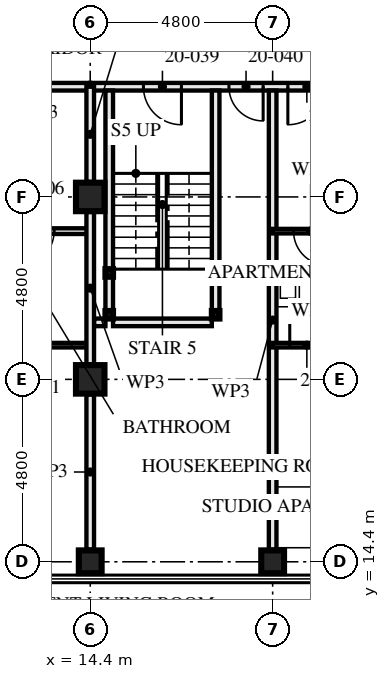
"""IFC4 building model, lengths in metres.
Left out: names, types, materials, properties, quantities, classifications, styles, units other than length and angle.
Written with IfcOpenShell. Run it as: python <this file> out.ifc"""

import sys

from ifc_helpers import new_model, si_unit, direction, frame, frame_2d, origin, origin_2d, place, context, subcontext, project, spatial, rectangle, hollow_rectangle, extrude, element, fill, save


model = new_model("IFC4")
c1 = context("Model", 3, precision=1e-05, world=origin(), true_north=direction((0.0, 1.0)))
c2 = subcontext(c1, "Body", "Model", "MODEL_VIEW")
j1 = project(units=[si_unit("LENGTHUNIT", "METRE"), si_unit("PLANEANGLEUNIT", "RADIAN")], contexts=[c1])
p1 = place(None, origin())
s1 = spatial("IfcSite", under=j1, at=p1, CompositionType="ELEMENT")
p2 = place(p1, origin())
s2 = spatial("IfcBuilding", under=s1, at=p2, CompositionType="ELEMENT")
p3 = place(p2, frame((0.0, 0.0, 76.0)))
s3 = spatial("IfcBuildingStorey", under=s2, at=p3, CompositionType="ELEMENT", Elevation=76.0)
p4 = place(p3, frame((14.4, 14.4, 0.0), z_axis=(0.0, 0.0, 1.0), x_axis=(0.0, 1.0, 0.0)))
e1 = element("IfcColumn", 1, at=p4, inside=s3, PredefinedType="COLUMN", context=c2, shape_type="SweptSolid", body=[
    extrude(hollow_rectangle(XDim=0.6, YDim=0.6, WallThickness=0.08, at=origin_2d()), origin(), (0.0, 0.0, 1.0), 3.5),
])
for number, where, z_axis, x_axis in (
    (2, (14.4, 19.2, 0.0), (0.0, 0.0, 1.0), (1.0, 0.0, 0.0)),
    (3, (14.4, 24.0, 0.0), (0.0, 0.0, 1.0), (1.0, 0.0, 0.0)),
):
    element("IfcColumn", number, at=place(p3, frame(where, z_axis=z_axis, x_axis=x_axis)), inside=s3, PredefinedType="COLUMN", context=c2, shape_type="SweptSolid", body=[
        extrude(hollow_rectangle(XDim=0.75, YDim=0.75, WallThickness=0.08, at=origin_2d()), origin(), (0.0, 0.0, 1.0), 3.5),
    ])
p5 = place(p3, frame((19.2, 14.4, 0.0), z_axis=(0.0, 0.0, 1.0), x_axis=(0.0, 1.0, 0.0)))
e4 = element("IfcColumn", 4, at=p5, inside=s3, PredefinedType="COLUMN", context=c2, shape_type="SweptSolid", body=[
    extrude(hollow_rectangle(XDim=0.6, YDim=0.6, WallThickness=0.08, at=origin_2d()), origin(), (0.0, 0.0, 1.0), 3.5),
])
for number, where, z_axis, x_axis in (
    (5, (14.9, 20.9, 0.0), (0.0, 0.0, 1.0), (1.0, 0.0, 0.0)),
    (6, (17.7, 20.9, 0.0), (0.0, 0.0, 1.0), (1.0, 0.0, 0.0)),
    (7, (14.9, 22.0, 0.0), (0.0, 0.0, 1.0), (1.0, 0.0, 0.0)),
    (8, (17.7, 22.0, 0.0), (0.0, 0.0, 1.0), (1.0, 0.0, 0.0)),
):
    element("IfcColumn", number, at=place(p3, frame(where, z_axis=z_axis, x_axis=x_axis)), inside=s3, PredefinedType="COLUMN", context=c2, shape_type="SweptSolid", body=[
        extrude(hollow_rectangle(XDim=0.2, YDim=0.2, WallThickness=0.008, at=origin_2d()), origin(), (0.0, 0.0, 1.0), 3.25),
    ])
p6 = place(p3, frame((11.6, 23.1, 0.0), z_axis=(0.0, 0.0, 1.0), x_axis=(1.0, 0.0, 0.0)))
e9 = element("IfcWall", 9, at=p6, inside=s3, PredefinedType="PARTITIONING", context=c2, shape_type="SweptSolid", body=[
    extrude(rectangle(XDim=2.8, YDim=0.15, at=frame_2d((1.4, 0.0))), origin(), (0.0, 0.0, 1.0), 3.25),
])
p7 = place(p6, frame((0.95, 0.0, 0.0)))
e10 = element("IfcOpeningElement", 10, at=p7, cuts=e9, PredefinedType="OPENING", context=c2, shape_type="SweptSolid", body=[
    extrude(rectangle(XDim=0.9, YDim=2.1, at=frame_2d((0.45, 1.05))), frame((0.0, 0.085, 0.0), z_axis=(0.0, -1.0, 0.0), x_axis=(1.0, 0.0, 0.0)), (0.0, 0.0, 1.0), 0.171),
])
p8 = place(p3, frame((9.6, 20.1, 0.0), z_axis=(0.0, 0.0, 1.0), x_axis=(1.0, 0.0, 0.0)))
e11 = element("IfcWall", 11, at=p8, inside=s3, PredefinedType="PARTITIONING", context=c2, shape_type="SweptSolid", body=[
    extrude(rectangle(XDim=4.8, YDim=0.12, at=frame_2d((2.4, 0.0))), origin(), (0.0, 0.0, 1.0), 3.25),
])
p9 = place(p8, frame((0.45, 0.0, 0.0)))
e12 = element("IfcOpeningElement", 12, at=p9, cuts=e11, PredefinedType="OPENING", context=c2, shape_type="SweptSolid", body=[
    extrude(rectangle(XDim=0.9, YDim=2.1, at=frame_2d((0.45, 1.05))), frame((0.0, 0.071, 0.0), z_axis=(0.0, -1.0, 0.0), x_axis=(1.0, 0.0, 0.0)), (0.0, 0.0, 1.0), 0.141),
])
p10 = place(p3, frame((4.8, 26.9, 0.0), z_axis=(0.0, 0.0, 1.0), x_axis=(1.0, 0.0, 0.0)))
e13 = element("IfcWall", 13, at=p10, inside=s3, PredefinedType="PARTITIONING", context=c2, shape_type="SweptSolid", body=[
    extrude(rectangle(XDim=9.6, YDim=0.2, at=frame_2d((4.8, 0.0))), origin(), (0.0, 0.0, 1.0), 3.25),
])
p11 = place(p10, frame((0.4, 0.0, 0.0)))
e14 = element("IfcOpeningElement", 14, at=p11, cuts=e13, PredefinedType="OPENING", context=c2, shape_type="SweptSolid", body=[
    extrude(rectangle(XDim=1.0, YDim=2.1, at=frame_2d((0.5, 1.05))), frame((0.0, 0.111, 0.0), z_axis=(0.0, -1.0, 0.0), x_axis=(1.0, 0.0, 0.0)), (0.0, 0.0, 1.0), 0.221),
])
p12 = place(p10, frame((5.2, 0.0, 0.0)))
e15 = element("IfcOpeningElement", 15, at=p12, cuts=e13, PredefinedType="OPENING", context=c2, shape_type="SweptSolid", body=[
    extrude(rectangle(XDim=1.0, YDim=2.1, at=frame_2d((0.5, 1.05))), frame((0.0, 0.111, 0.0), z_axis=(0.0, -1.0, 0.0), x_axis=(1.0, 0.0, 0.0)), (0.0, 0.0, 1.0), 0.221),
])
p13 = place(p3, frame((14.9, 21.0, 0.0), z_axis=(0.0, 0.0, 1.0), x_axis=(0.0, 1.0, 0.0)))
e16 = element("IfcWall", 16, at=p13, inside=s3, PredefinedType="SOLIDWALL", context=c2, shape_type="SweptSolid", body=[
    extrude(rectangle(XDim=0.9, YDim=0.2, at=frame_2d((0.45, 0.0))), origin(), (0.0, 0.0, 1.0), 2.94),
])
p14 = place(p3, frame((14.9, 22.1, 0.0), z_axis=(0.0, 0.0, 1.0), x_axis=(0.0, 1.0, 0.0)))
e17 = element("IfcWall", 17, at=p14, inside=s3, PredefinedType="SOLIDWALL", context=c2, shape_type="SweptSolid", body=[
    extrude(rectangle(XDim=4.7, YDim=0.2, at=frame_2d((2.35, 0.0))), origin(), (0.0, 0.0, 1.0), 2.94),
])
p15 = place(p3, frame((17.7, 21.0, 0.0), z_axis=(0.0, 0.0, 1.0), x_axis=(0.0, 1.0, 0.0)))
e18 = element("IfcWall", 18, at=p15, inside=s3, PredefinedType="SOLIDWALL", context=c2, shape_type="SweptSolid", body=[
    extrude(rectangle(XDim=0.9, YDim=0.2, at=frame_2d((0.45, 0.0))), origin(), (0.0, 0.0, 1.0), 2.94),
])
p16 = place(p3, frame((17.7, 22.1, 0.0), z_axis=(0.0, 0.0, 1.0), x_axis=(0.0, 1.0, 0.0)))
e19 = element("IfcWall", 19, at=p16, inside=s3, PredefinedType="SOLIDWALL", context=c2, shape_type="SweptSolid", body=[
    extrude(rectangle(XDim=4.7, YDim=0.2, at=frame_2d((2.35, 0.0))), origin(), (0.0, 0.0, 1.0), 2.94),
])
p17 = place(p3, frame((14.5, 20.7, 0.0), z_axis=(0.0, 0.0, 1.0), x_axis=(1.0, 0.0, 0.0)))
e20 = element("IfcWall", 20, at=p17, inside=s3, PredefinedType="SOLIDWALL", context=c2, shape_type="SweptSolid", body=[
    extrude(rectangle(XDim=0.3, YDim=0.2, at=frame_2d((0.15, 0.0))), origin(), (0.0, 0.0, 1.0), 3.25),
])
p18 = place(p3, frame((15.0, 20.7, 0.0), z_axis=(0.0, 0.0, 1.0), x_axis=(1.0, 0.0, 0.0)))
e21 = element("IfcWall", 21, at=p18, inside=s3, PredefinedType="SOLIDWALL", context=c2, shape_type="SweptSolid", body=[
    extrude(rectangle(XDim=2.6, YDim=0.2, at=frame_2d((1.3, 0.0))), origin(), (0.0, 0.0, 1.0), 3.25),
])
p19 = place(p3, frame((19.2, 14.72, 0.0), z_axis=(0.0, 0.0, 1.0), x_axis=(0.0, 1.0, 0.0)))
e22 = element("IfcWall", 22, at=p19, inside=s3, PredefinedType="PARTITIONING", context=c2, shape_type="SweptSolid", body=[
    extrude(rectangle(XDim=12.08, YDim=0.2, at=frame_2d((6.04, 0.0))), origin(), (0.0, 0.0, 1.0), 2.04),
])
p20 = place(p3, frame((19.2, 23.1, 0.0), z_axis=(0.0, 0.0, 1.0), x_axis=(1.0, 0.0, 0.0)))
e23 = element("IfcWall", 23, at=p20, inside=s3, PredefinedType="PARTITIONING", context=c2, shape_type="SweptSolid", body=[
    extrude(rectangle(XDim=2.0, YDim=0.12, at=frame_2d((1.0, 0.0))), origin(), (0.0, 0.0, 1.0), 3.25),
])
p21 = place(p20, frame((0.55, 0.0, 0.0)))
e24 = element("IfcOpeningElement", 24, at=p21, cuts=e23, PredefinedType="OPENING", context=c2, shape_type="SweptSolid", body=[
    extrude(rectangle(XDim=0.9, YDim=2.1, at=frame_2d((0.45, 1.05))), frame((0.0, 0.071, 0.0), z_axis=(0.0, -1.0, 0.0), x_axis=(1.0, 0.0, 0.0)), (0.0, 0.0, 1.0), 0.141),
])
p22 = place(p3, frame((19.2, 20.1, 0.0), z_axis=(0.0, 0.0, 1.0), x_axis=(1.0, 0.0, 0.0)))
e25 = element("IfcWall", 25, at=p22, inside=s3, PredefinedType="PARTITIONING", context=c2, shape_type="SweptSolid", body=[
    extrude(rectangle(XDim=4.8, YDim=0.12, at=frame_2d((2.4, 0.0))), origin(), (0.0, 0.0, 1.0), 3.25),
])
p23 = place(p22, frame((0.45, 0.0, 0.0)))
e26 = element("IfcOpeningElement", 26, at=p23, cuts=e25, PredefinedType="OPENING", context=c2, shape_type="SweptSolid", body=[
    extrude(rectangle(XDim=0.9, YDim=2.1, at=frame_2d((0.45, 1.05))), frame((0.0, 0.071, 0.0), z_axis=(0.0, -1.0, 0.0), x_axis=(1.0, 0.0, 0.0)), (0.0, 0.0, 1.0), 0.141),
])
p24 = place(p3, frame((14.4, 26.9, 0.0), z_axis=(0.0, 0.0, 1.0), x_axis=(1.0, 0.0, 0.0)))
e27 = element("IfcWall", 27, at=p24, inside=s3, PredefinedType="PARTITIONING", context=c2, shape_type="SweptSolid", body=[
    extrude(rectangle(XDim=14.4, YDim=0.2, at=frame_2d((7.2, 0.0))), origin(), (0.0, 0.0, 1.0), 2.04),
])
p25 = place(p24, frame((1.4, 0.0, 0.0)))
e28 = element("IfcOpeningElement", 28, at=p25, cuts=e27, PredefinedType="OPENING", context=c2, shape_type="SweptSolid", body=[
    extrude(rectangle(XDim=1.0, YDim=2.0, at=frame_2d((0.5, 1.0))), frame((0.0, 0.111, 0.0), z_axis=(0.0, -1.0, 0.0), x_axis=(1.0, 0.0, 0.0)), (0.0, 0.0, 1.0), 0.221),
])
p26 = place(p24, frame((3.65, 0.0, 0.0)))
e29 = element("IfcOpeningElement", 29, at=p26, cuts=e27, PredefinedType="OPENING", context=c2, shape_type="SweptSolid", body=[
    extrude(rectangle(XDim=0.9, YDim=2.0, at=frame_2d((0.45, 1.0))), frame((0.0, 0.111, 0.0), z_axis=(0.0, -1.0, 0.0), x_axis=(1.0, 0.0, 0.0)), (0.0, 0.0, 1.0), 0.221),
])
p27 = place(p24, frame((5.2, 0.0, 0.0)))
e30 = element("IfcOpeningElement", 30, at=p27, cuts=e27, PredefinedType="OPENING", context=c2, shape_type="SweptSolid", body=[
    extrude(rectangle(XDim=1.0, YDim=2.0, at=frame_2d((0.5, 1.0))), frame((0.0, 0.111, 0.0), z_axis=(0.0, -1.0, 0.0), x_axis=(1.0, 0.0, 0.0)), (0.0, 0.0, 1.0), 0.221),
])
p28 = place(p24, frame((10.0, 0.0, 0.0)))
e31 = element("IfcOpeningElement", 31, at=p28, cuts=e27, PredefinedType="OPENING", context=c2, shape_type="SweptSolid", body=[
    extrude(rectangle(XDim=1.0, YDim=2.0, at=frame_2d((0.5, 1.0))), frame((0.0, 0.111, 0.0), z_axis=(0.0, -1.0, 0.0), x_axis=(1.0, 0.0, 0.0)), (0.0, 0.0, 1.0), 0.221),
])
p29 = place(p3, frame((14.4, 14.72, 0.0), z_axis=(0.0, 0.0, 1.0), x_axis=(0.0, 1.0, 0.0)))
e32 = element("IfcWall", 32, at=p29, inside=s3, PredefinedType="PARTITIONING", context=c2, shape_type="SweptSolid", body=[
    extrude(rectangle(XDim=4.085, YDim=0.2, at=frame_2d((2.042, 0.0))), origin(), (0.0, 0.0, 1.0), 2.04),
])
p30 = place(p3, frame((14.4, 19.595, 0.0), z_axis=(0.0, 0.0, 1.0), x_axis=(0.0, 1.0, 0.0)))
e33 = element("IfcWall", 33, at=p30, inside=s3, PredefinedType="PARTITIONING", context=c2, shape_type="SweptSolid", body=[
    extrude(rectangle(XDim=4.01, YDim=0.2, at=frame_2d((2.005, 0.0))), origin(), (0.0, 0.0, 1.0), 2.04),
])
p31 = place(p3, frame((14.4, 24.395, 0.0), z_axis=(0.0, 0.0, 1.0), x_axis=(0.0, 1.0, 0.0)))
e34 = element("IfcWall", 34, at=p31, inside=s3, PredefinedType="PARTITIONING", context=c2, shape_type="SweptSolid", body=[
    extrude(rectangle(XDim=2.505, YDim=0.2, at=frame_2d((1.252, 0.0))), origin(), (0.0, 0.0, 1.0), 2.04),
])
p32 = place(p7, frame((0.9, 0.0, 0.0), z_axis=(0.0, 0.0, 1.0), x_axis=(-1.0, 0.0, 0.0)))
e35 = element("IfcDoor", 35, at=p32, inside=s3, OperationType="SINGLE_SWING_LEFT", PredefinedType="DOOR", context=c2, shape_type="SweptSolid", body=[
    extrude(rectangle(XDim=0.9, YDim=2.1, at=frame_2d((0.45, 1.05))), frame((0.0, 0.022, 0.0), z_axis=(0.0, -1.0, 0.0), x_axis=(1.0, 0.0, 0.0)), (0.0, 0.0, 1.0), 0.044),
])
fill(e10, e35)
p33 = place(p21, frame((0.9, 0.0, 0.0), z_axis=(0.0, 0.0, 1.0), x_axis=(-1.0, 0.0, 0.0)))
e36 = element("IfcDoor", 36, at=p33, inside=s3, OperationType="SINGLE_SWING_RIGHT", PredefinedType="DOOR", context=c2, shape_type="SweptSolid", body=[
    extrude(rectangle(XDim=0.9, YDim=2.1, at=frame_2d((0.45, 1.05))), frame((0.0, 0.022, 0.0), z_axis=(0.0, -1.0, 0.0), x_axis=(1.0, 0.0, 0.0)), (0.0, 0.0, 1.0), 0.044),
])
fill(e24, e36)
p34 = place(p23, origin())
e37 = element("IfcDoor", 37, at=p34, inside=s3, OperationType="SINGLE_SWING_RIGHT", PredefinedType="DOOR", context=c2, shape_type="SweptSolid", body=[
    extrude(rectangle(XDim=0.9, YDim=2.1, at=frame_2d((0.45, 1.05))), frame((0.0, 0.022, 0.0), z_axis=(0.0, -1.0, 0.0), x_axis=(1.0, 0.0, 0.0)), (0.0, 0.0, 1.0), 0.044),
])
fill(e26, e37)
p35 = place(p25, frame((1.0, 0.0, 0.0), z_axis=(0.0, 0.0, 1.0), x_axis=(-1.0, 0.0, 0.0)))
e38 = element("IfcDoor", 38, at=p35, inside=s3, OperationType="SINGLE_SWING_RIGHT", PredefinedType="DOOR", context=c2, shape_type="SweptSolid", body=[
    extrude(rectangle(XDim=1.0, YDim=2.0, at=frame_2d((0.5, 1.0))), frame((0.0, 0.032, 0.0), z_axis=(0.0, -1.0, 0.0), x_axis=(1.0, 0.0, 0.0)), (0.0, 0.0, 1.0), 0.064),
])
fill(e28, e38)
p36 = place(p26, frame((0.9, 0.0, 0.0), z_axis=(0.0, 0.0, 1.0), x_axis=(-1.0, 0.0, 0.0)))
e39 = element("IfcDoor", 39, at=p36, inside=s3, OperationType="SINGLE_SWING_RIGHT", PredefinedType="DOOR", context=c2, shape_type="SweptSolid", body=[
    extrude(rectangle(XDim=0.9, YDim=2.0, at=frame_2d((0.45, 1.0))), frame((0.0, 0.027, 0.0), z_axis=(0.0, -1.0, 0.0), x_axis=(1.0, 0.0, 0.0)), (0.0, 0.0, 1.0), 0.054),
])
fill(e29, e39)
p37 = place(p27, frame((1.0, 0.0, 0.0), z_axis=(0.0, 0.0, 1.0), x_axis=(-1.0, 0.0, 0.0)))
e40 = element("IfcDoor", 40, at=p37, inside=s3, OperationType="SINGLE_SWING_LEFT", PredefinedType="DOOR", context=c2, shape_type="SweptSolid", body=[
    extrude(rectangle(XDim=1.0, YDim=2.0, at=frame_2d((0.5, 1.0))), frame((0.0, 0.027, 0.0), z_axis=(0.0, -1.0, 0.0), x_axis=(1.0, 0.0, 0.0)), (0.0, 0.0, 1.0), 0.054),
])
fill(e30, e40)
save(model, sys.argv[1])
